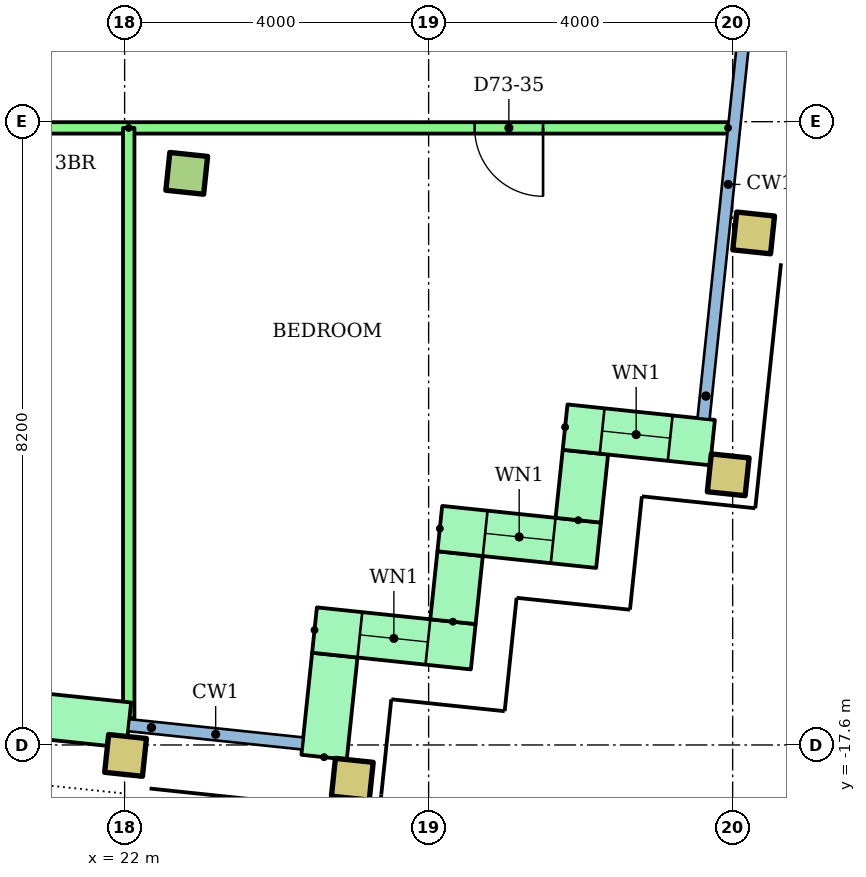
"""IFC4 building model, lengths in metres.
Left out: names, types, materials, properties, quantities, classifications, styles, units other than length and angle.
Written with IfcOpenShell. Run it as: python <this file> out.ifc"""

import sys

from ifc_helpers import new_model, si_unit, direction, frame, frame_2d, origin, origin_2d, place, context, subcontext, project, spatial, rectangle, hollow_rectangle, extrude, element, fill, save


model = new_model("IFC4")
c1 = context("Model", 3, precision=1e-05, world=origin(), true_north=direction((0.0, 1.0)))
c2 = subcontext(c1, "Body", "Model", "MODEL_VIEW")
j1 = project(units=[si_unit("LENGTHUNIT", "METRE"), si_unit("PLANEANGLEUNIT", "RADIAN")], contexts=[c1])
p1 = place(None, origin())
s1 = spatial("IfcSite", under=j1, at=p1, CompositionType="ELEMENT")
p2 = place(p1, origin())
s2 = spatial("IfcBuilding", under=s1, at=p2, CompositionType="ELEMENT")
p3 = place(p2, frame((0.0, 0.0, 278.7)))
s3 = spatial("IfcBuildingStorey", under=s2, at=p3, CompositionType="ELEMENT", Elevation=278.7)
for number, where, z_axis, x_axis in (
    (1, (22.012, -17.737, 0.0), (0.0, 0.0, 1.0), (0.995, -0.105, 0.0)),
    (2, (24.996, -18.051, 0.0), (0.0, 0.0, 1.0), (0.995, -0.105, 0.0)),
    (3, (29.942, -14.046, 0.0), (0.0, 0.0, 1.0), (0.995, -0.105, 0.0)),
):
    element("IfcColumn", number, at=place(p3, frame(where, z_axis=z_axis, x_axis=x_axis)), inside=s3, PredefinedType="COLUMN", context=c2, shape_type="SweptSolid", body=[
        extrude(hollow_rectangle(XDim=0.5, YDim=0.5, WallThickness=0.025, at=origin_2d()), origin(), (0.0, 0.0, 1.0), 3.2),
    ])
p4 = place(p3, frame((22.817, -10.08, 0.0), z_axis=(0.0, 0.0, 1.0), x_axis=(0.994521895368, -0.104528463268, 0.0)))
e4 = element("IfcColumn", 4, at=p4, inside=s3, PredefinedType="COLUMN", context=c2, shape_type="SweptSolid", body=[
    extrude(rectangle(XDim=0.5, YDim=0.5, at=origin_2d()), origin(), (0.0, 0.0, 1.0), 3.2),
])
p5 = place(p3, frame((30.276, -10.864, 0.0), z_axis=(0.0, 0.0, 1.0), x_axis=(0.994521895368, -0.104528463268, 0.0)))
e5 = element("IfcColumn", 5, at=p5, inside=s3, PredefinedType="COLUMN", context=c2, shape_type="SweptSolid", body=[
    extrude(hollow_rectangle(XDim=0.5, YDim=0.5, WallThickness=0.025, at=origin_2d()), origin(), (0.0, 0.0, 1.0), 3.2),
])
p6 = place(p3, frame((18.076, -16.921, 0.0), z_axis=(0.0, 0.0, 1.0), x_axis=(0.994519156568, -0.104554517933, 0.0)))
e6 = element("IfcWall", 6, at=p6, inside=s3, PredefinedType="STANDARD", context=c2, shape_type="SweptSolid", body=[
    extrude(rectangle(XDim=4.0, YDim=0.6, at=frame_2d((2.0, 0.0))), origin(), (0.0, 0.0, 1.0), 2.8),
])
p7 = place(p6, frame((1.4, 0.0, 0.0)))
e7 = element("IfcOpeningElement", 7, at=p7, cuts=e6, PredefinedType="OPENING", context=c2, shape_type="SweptSolid", body=[
    extrude(rectangle(XDim=1.2, YDim=2.1, at=frame_2d((0.6, 1.05))), frame((0.0, 0.31, 0.0), z_axis=(0.0, -1.0, 0.0), x_axis=(1.0, 0.0, 0.0)), (0.0, 0.0, 1.0), 0.62),
])
p8 = place(p3, frame((24.625, -17.76, 0.0), z_axis=(0.0, 0.0, 1.0), x_axis=(0.104355269718, 0.994540083497, 0.0)))
e8 = element("IfcWall", 8, at=p8, inside=s3, PredefinedType="STANDARD", context=c2, shape_type="SweptSolid", body=[
    extrude(rectangle(XDim=1.35, YDim=0.6, at=frame_2d((0.675, 0.0))), origin(), (0.0, 0.0, 1.0), 2.8),
])
p9 = place(p3, frame((24.499, -16.088, 0.0), z_axis=(0.0, 0.0, 1.0), x_axis=(0.994522640205, -0.104521376379, 0.0)))
e9 = element("IfcWall", 9, at=p9, inside=s3, PredefinedType="STANDARD", context=c2, shape_type="SweptSolid", body=[
    extrude(rectangle(XDim=2.1, YDim=0.6, at=frame_2d((1.05, 0.0))), origin(), (0.0, 0.0, 1.0), 2.8),
])
p10 = place(p9, frame((0.6, 0.0, 0.9)))
e10 = element("IfcOpeningElement", 10, at=p10, cuts=e9, PredefinedType="OPENING", context=c2, shape_type="SweptSolid", body=[
    extrude(rectangle(XDim=0.9, YDim=1.5, at=frame_2d((0.45, 0.75))), frame((0.0, 0.31, 0.0), z_axis=(0.0, -1.0, 0.0), x_axis=(1.0, 0.0, 0.0)), (0.0, 0.0, 1.0), 0.62),
])
p11 = place(p3, frame((26.32, -15.978, 0.0), z_axis=(0.0, 0.0, 1.0), x_axis=(0.104444712852, 0.994530694326, 0.0)))
e11 = element("IfcWall", 11, at=p11, inside=s3, PredefinedType="STANDARD", context=c2, shape_type="SweptSolid", body=[
    extrude(rectangle(XDim=0.9, YDim=0.6, at=frame_2d((0.45, 0.0))), origin(), (0.0, 0.0, 1.0), 2.8),
])
p12 = place(p3, frame((26.147, -14.753, 0.0), z_axis=(0.0, 0.0, 1.0), x_axis=(0.994522640205, -0.104521376379, 0.0)))
e12 = element("IfcWall", 12, at=p12, inside=s3, PredefinedType="STANDARD", context=c2, shape_type="SweptSolid", body=[
    extrude(rectangle(XDim=2.1, YDim=0.6, at=frame_2d((1.05, 0.0))), origin(), (0.0, 0.0, 1.0), 2.8),
])
p13 = place(p12, frame((0.6, 0.0, 0.9)))
e13 = element("IfcOpeningElement", 13, at=p13, cuts=e12, PredefinedType="OPENING", context=c2, shape_type="SweptSolid", body=[
    extrude(rectangle(XDim=0.9, YDim=1.5, at=frame_2d((0.45, 0.75))), frame((0.0, 0.31, 0.0), z_axis=(0.0, -1.0, 0.0), x_axis=(1.0, 0.0, 0.0)), (0.0, 0.0, 1.0), 0.62),
])
p14 = place(p3, frame((27.969, -14.643, 0.0), z_axis=(0.0, 0.0, 1.0), x_axis=(0.104416541099, 0.994533652495, 0.0)))
e14 = element("IfcWall", 14, at=p14, inside=s3, PredefinedType="STANDARD", context=c2, shape_type="SweptSolid", body=[
    extrude(rectangle(XDim=0.9, YDim=0.6, at=frame_2d((0.45, 0.0))), origin(), (0.0, 0.0, 1.0), 2.8),
])
p15 = place(p3, frame((27.796, -13.418, 0.0), z_axis=(0.0, 0.0, 1.0), x_axis=(0.994519850893, -0.104547913319, 0.0)))
e15 = element("IfcWall", 15, at=p15, inside=s3, PredefinedType="STANDARD", context=c2, shape_type="SweptSolid", body=[
    extrude(rectangle(XDim=1.95, YDim=0.6, at=frame_2d((0.975, 0.0))), origin(), (0.0, 0.0, 1.0), 2.8),
])
p16 = place(p15, frame((0.49, 0.0, 0.9)))
e16 = element("IfcOpeningElement", 16, at=p16, cuts=e15, PredefinedType="OPENING", context=c2, shape_type="SweptSolid", body=[
    extrude(rectangle(XDim=0.9, YDim=1.5, at=frame_2d((0.45, 0.75))), frame((0.0, 0.31, 0.0), z_axis=(0.0, -1.0, 0.0), x_axis=(1.0, 0.0, 0.0)), (0.0, 0.0, 1.0), 0.62),
])
p17 = place(p3, frame((29.94, -9.482, 0.0), z_axis=(0.0, 0.0, 1.0), x_axis=(-1.0, 0.0, 0.0)))
e17 = element("IfcWall", 17, at=p17, inside=s3, PredefinedType="PARTITIONING", context=c2, shape_type="SweptSolid", body=[
    extrude(rectangle(XDim=23.798, YDim=0.15, at=frame_2d((11.899, 0.0))), origin(), (0.0, 0.0, 1.0), 2.4),
])
p18 = place(p17, frame((19.32, 0.0, 0.0)))
e18 = element("IfcOpeningElement", 18, at=p18, cuts=e17, PredefinedType="OPENING", context=c2, shape_type="SweptSolid", body=[
    extrude(rectangle(XDim=1.0, YDim=2.1, at=frame_2d((0.5, 1.05))), frame((0.0, 0.085, 0.0), z_axis=(0.0, -1.0, 0.0), x_axis=(1.0, 0.0, 0.0)), (0.0, 0.0, 1.0), 0.17),
])
p19 = place(p17, frame((13.403, 0.0, 0.0)))
e19 = element("IfcOpeningElement", 19, at=p19, cuts=e17, PredefinedType="OPENING", context=c2, shape_type="SweptSolid", body=[
    extrude(rectangle(XDim=0.9, YDim=2.1, at=frame_2d((0.45, 1.05))), frame((0.0, 0.085, 0.0), z_axis=(0.0, -1.0, 0.0), x_axis=(1.0, 0.0, 0.0)), (0.0, 0.0, 1.0), 0.17),
])
p20 = place(p17, frame((9.425, 0.0, 0.0)))
e20 = element("IfcOpeningElement", 20, at=p20, cuts=e17, PredefinedType="OPENING", context=c2, shape_type="SweptSolid", body=[
    extrude(rectangle(XDim=0.9, YDim=2.1, at=frame_2d((0.45, 1.05))), frame((0.0, 0.085, 0.0), z_axis=(0.0, -1.0, 0.0), x_axis=(1.0, 0.0, 0.0)), (0.0, 0.0, 1.0), 0.17),
])
p21 = place(p17, frame((2.434, 0.0, 0.0)))
e21 = element("IfcOpeningElement", 21, at=p21, cuts=e17, PredefinedType="OPENING", context=c2, shape_type="SweptSolid", body=[
    extrude(rectangle(XDim=0.9, YDim=2.1, at=frame_2d((0.45, 1.05))), frame((0.0, 0.085, 0.0), z_axis=(0.0, -1.0, 0.0), x_axis=(1.0, 0.0, 0.0)), (0.0, 0.0, 1.0), 0.17),
])
p22 = place(p3, frame((22.054, -9.482, 0.0), z_axis=(0.0, 0.0, 1.0), x_axis=(0.0, -1.0, 0.0)))
e22 = element("IfcWall", 22, at=p22, inside=s3, PredefinedType="PARTITIONING", context=c2, shape_type="SweptSolid", body=[
    extrude(rectangle(XDim=7.767, YDim=0.15, at=frame_2d((3.884, 0.0))), origin(), (0.0, 0.0, 1.0), 2.4),
])
p23 = place(p10, origin())
e23 = element("IfcWindow", 23, at=p23, inside=s3, PartitioningType="SINGLE_PANEL", PredefinedType="WINDOW", context=c2, shape_type="SweptSolid", body=[
    extrude(rectangle(XDim=0.9, YDim=1.5, at=frame_2d((0.45, 0.75))), frame((0.0, 0.03, 0.0), z_axis=(0.0, -1.0, 0.0), x_axis=(1.0, 0.0, 0.0)), (0.0, 0.0, 1.0), 0.06),
])
fill(e10, e23)
p24 = place(p13, origin())
e24 = element("IfcWindow", 24, at=p24, inside=s3, PartitioningType="SINGLE_PANEL", PredefinedType="WINDOW", context=c2, shape_type="SweptSolid", body=[
    extrude(rectangle(XDim=0.9, YDim=1.5, at=frame_2d((0.45, 0.75))), frame((0.0, 0.03, 0.0), z_axis=(0.0, -1.0, 0.0), x_axis=(1.0, 0.0, 0.0)), (0.0, 0.0, 1.0), 0.06),
])
fill(e13, e24)
p25 = place(p16, origin())
e25 = element("IfcWindow", 25, at=p25, inside=s3, PartitioningType="SINGLE_PANEL", PredefinedType="WINDOW", context=c2, shape_type="SweptSolid", body=[
    extrude(rectangle(XDim=0.9, YDim=1.5, at=frame_2d((0.45, 0.75))), frame((0.0, 0.03, 0.0), z_axis=(0.0, -1.0, 0.0), x_axis=(1.0, 0.0, 0.0)), (0.0, 0.0, 1.0), 0.06),
])
fill(e16, e25)
p26 = place(p21, origin())
e26 = element("IfcDoor", 26, at=p26, inside=s3, OperationType="SINGLE_SWING_LEFT", PredefinedType="DOOR", context=c2, shape_type="SweptSolid", body=[
    extrude(rectangle(XDim=0.9, YDim=2.1, at=frame_2d((0.45, 1.05))), frame((0.0, 0.025, 0.0), z_axis=(0.0, -1.0, 0.0), x_axis=(1.0, 0.0, 0.0)), (0.0, 0.0, 1.0), 0.05),
])
fill(e21, e26)
save(model, sys.argv[1])
